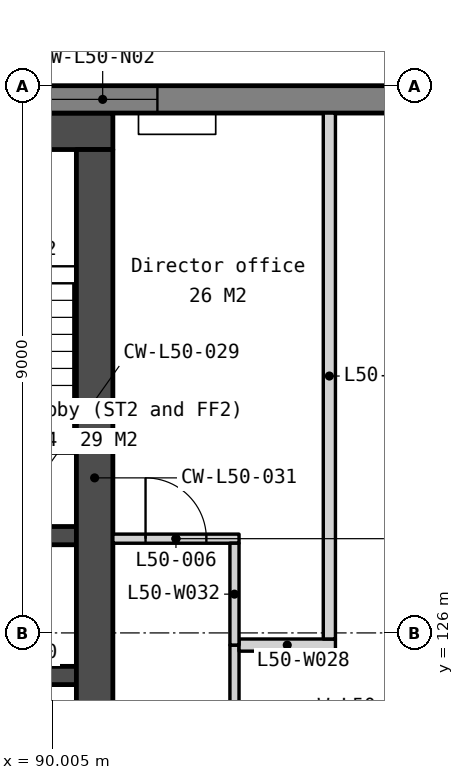
"""IFC4 building model, lengths in metres.
Left out: names, types, materials, properties, quantities, classifications, styles, units other than length and angle.
Written with IfcOpenShell. Run it as: python <this file> out.ifc"""

import sys

from ifc_helpers import new_model, si_unit, direction, frame, frame_2d, origin, place, context, subcontext, project, spatial, polyline, rectangle, outline, extrude, element, fill, save


model = new_model("IFC4")
c1 = context("Model", 3, precision=1e-05, world=origin(), true_north=direction((0.0, 1.0)))
c2 = subcontext(c1, "Body", "Model", "MODEL_VIEW")
j1 = project(units=[si_unit("LENGTHUNIT", "METRE"), si_unit("PLANEANGLEUNIT", "RADIAN")], contexts=[c1])
p1 = place(None, origin())
s1 = spatial("IfcSite", under=j1, at=p1, CompositionType="ELEMENT")
p2 = place(p1, origin())
s2 = spatial("IfcBuilding", under=s1, at=p2, CompositionType="ELEMENT")
p3 = place(p2, frame((0.0, 0.0, 199.7)))
s3 = spatial("IfcBuildingStorey", under=s2, at=p3, CompositionType="ELEMENT", Elevation=199.7)
p4 = place(p3, frame((69.0, 134.25, 0.0), z_axis=(0.0, 0.0, 1.0), x_axis=(1.0, 0.0, 0.0)))
e1 = element("IfcWall", 1, at=p4, inside=s3, PredefinedType="SOLIDWALL", context=c2, shape_type="SweptSolid", body=[
    extrude(rectangle(XDim=22.0, YDim=0.6, at=frame_2d((11.0, 0.0))), origin(), (0.0, 0.0, 1.0), 3.75),
])
for number, where, z_axis, x_axis in (
    (2, (87.85, 127.6, 0.0), (0.0, 0.0, 1.0), (1.0, 0.0, 0.0)),
    (3, (87.85, 125.3, 0.0), (0.0, 0.0, 1.0), (1.0, 0.0, 0.0)),
):
    element("IfcWall", number, at=place(p3, frame(where, z_axis=z_axis, x_axis=x_axis)), inside=s3, PredefinedType="SOLIDWALL", context=c2, shape_type="SweptSolid", body=[
        extrude(rectangle(XDim=2.55, YDim=0.3, at=frame_2d((1.275, 0.0))), origin(), (0.0, 0.0, 1.0), 3.75),
    ])
p5 = place(p3, frame((90.7, 133.95, 0.0), z_axis=(0.0, 0.0, 1.0), x_axis=(0.0, -1.0, 0.0)))
e4 = element("IfcWall", 4, at=p5, inside=s3, PredefinedType="SOLIDWALL", context=c2, shape_type="SweptSolid", body=[
    extrude(rectangle(XDim=10.8, YDim=0.6, at=frame_2d((5.4, 0.0))), origin(), (0.0, 0.0, 1.0), 3.75),
])
p6 = place(p3, frame((99.365, 134.775, -0.15), z_axis=(0.0, 0.0, 1.0), x_axis=(-1.0, 0.0, 0.0)))
e5 = element("IfcWall", 5, at=p6, inside=s3, PredefinedType="SOLIDWALL", context=c2, shape_type="SweptSolid", body=[
    extrude(outline(polyline([(38.729, 0.0), (38.729, 3.9), (0.0, 3.9), (0.0, 0.0), (38.729, 0.0)])), frame((0.0, 0.225, 0.0), z_axis=(0.0, -1.0, 0.0), x_axis=(1.0, 0.0, 0.0)), (0.0, 0.0, 1.0), 0.45),
])
p7 = place(p6, frame((0.776, 0.0, 0.95)))
e6 = element("IfcOpeningElement", 6, at=p7, cuts=e5, PredefinedType="OPENING", context=c2, shape_type="SweptSolid", body=[
    extrude(rectangle(XDim=1.2, YDim=2.2, at=frame_2d((0.6, 1.1))), frame((0.0, 0.235, 0.0), z_axis=(0.0, -1.0, 0.0), x_axis=(1.0, 0.0, 0.0)), (0.0, 0.0, 1.0), 0.47),
])
p8 = place(p6, frame((7.632, 0.0, 0.95)))
e7 = element("IfcOpeningElement", 7, at=p8, cuts=e5, PredefinedType="OPENING", context=c2, shape_type="SweptSolid", body=[
    extrude(rectangle(XDim=1.8, YDim=2.2, at=frame_2d((0.9, 1.1))), frame((0.0, 0.235, 0.0), z_axis=(0.0, -1.0, 0.0), x_axis=(1.0, 0.0, 0.0)), (0.0, 0.0, 1.0), 0.47),
])
p9 = place(p6, frame((9.932, 0.0, 0.95)))
e8 = element("IfcOpeningElement", 8, at=p9, cuts=e5, PredefinedType="OPENING", context=c2, shape_type="SweptSolid", body=[
    extrude(rectangle(XDim=1.8, YDim=2.2, at=frame_2d((0.9, 1.1))), frame((0.0, 0.235, 0.0), z_axis=(0.0, -1.0, 0.0), x_axis=(1.0, 0.0, 0.0)), (0.0, 0.0, 1.0), 0.47),
])
p10 = place(p6, frame((17.315, 0.0, 0.95)))
e9 = element("IfcOpeningElement", 9, at=p10, cuts=e5, PredefinedType="OPENING", context=c2, shape_type="SweptSolid", body=[
    extrude(rectangle(XDim=1.8, YDim=2.2, at=frame_2d((0.9, 1.1))), frame((0.0, 0.235, 0.0), z_axis=(0.0, -1.0, 0.0), x_axis=(1.0, 0.0, 0.0)), (0.0, 0.0, 1.0), 0.47),
])
p11 = place(p6, frame((19.615, 0.0, 0.95)))
e10 = element("IfcOpeningElement", 10, at=p11, cuts=e5, PredefinedType="OPENING", context=c2, shape_type="SweptSolid", body=[
    extrude(rectangle(XDim=1.8, YDim=2.2, at=frame_2d((0.9, 1.1))), frame((0.0, 0.235, 0.0), z_axis=(0.0, -1.0, 0.0), x_axis=(1.0, 0.0, 0.0)), (0.0, 0.0, 1.0), 0.47),
])
p12 = place(p6, frame((26.997, 0.0, 0.95)))
e11 = element("IfcOpeningElement", 11, at=p12, cuts=e5, PredefinedType="OPENING", context=c2, shape_type="SweptSolid", body=[
    extrude(rectangle(XDim=1.8, YDim=2.2, at=frame_2d((0.9, 1.1))), frame((0.0, 0.235, 0.0), z_axis=(0.0, -1.0, 0.0), x_axis=(1.0, 0.0, 0.0)), (0.0, 0.0, 1.0), 0.47),
])
p13 = place(p6, frame((29.297, 0.0, 0.95)))
e12 = element("IfcOpeningElement", 12, at=p13, cuts=e5, PredefinedType="OPENING", context=c2, shape_type="SweptSolid", body=[
    extrude(rectangle(XDim=1.8, YDim=2.2, at=frame_2d((0.9, 1.1))), frame((0.0, 0.235, 0.0), z_axis=(0.0, -1.0, 0.0), x_axis=(1.0, 0.0, 0.0)), (0.0, 0.0, 1.0), 0.47),
])
p14 = place(p6, frame((36.753, 0.0, 0.95)))
e13 = element("IfcOpeningElement", 13, at=p14, cuts=e5, PredefinedType="OPENING", context=c2, shape_type="SweptSolid", body=[
    extrude(rectangle(XDim=1.2, YDim=2.2, at=frame_2d((0.6, 1.1))), frame((0.0, 0.235, 0.0), z_axis=(0.0, -1.0, 0.0), x_axis=(1.0, 0.0, 0.0)), (0.0, 0.0, 1.0), 0.47),
])
p15 = place(p3, frame((81.505, 98.627, -0.15), z_axis=(0.0, 0.0, 1.0), x_axis=(0.500002199942, 0.866024133644, 0.0)))
e14 = element("IfcWall", 14, at=p15, inside=s3, PredefinedType="SOLIDWALL", context=c2, shape_type="SweptSolid", body=[
    extrude(outline(polyline([(38.729, 0.0), (38.729, 3.9), (0.0, 3.9), (0.0, 0.0), (38.729, 0.0)])), frame((0.0, 0.225, 0.0), z_axis=(0.0, -1.0, 0.0), x_axis=(1.0, 0.0, 0.0)), (0.0, 0.0, 1.0), 0.45),
])
p16 = place(p15, frame((0.776, 0.0, 0.95)))
e15 = element("IfcOpeningElement", 15, at=p16, cuts=e14, PredefinedType="OPENING", context=c2, shape_type="SweptSolid", body=[
    extrude(rectangle(XDim=1.2, YDim=2.2, at=frame_2d((0.6, 1.1))), frame((0.0, 0.235, 0.0), z_axis=(0.0, -1.0, 0.0), x_axis=(1.0, 0.0, 0.0)), (0.0, 0.0, 1.0), 0.47),
])
p17 = place(p15, frame((7.632, 0.0, 0.95)))
e16 = element("IfcOpeningElement", 16, at=p17, cuts=e14, PredefinedType="OPENING", context=c2, shape_type="SweptSolid", body=[
    extrude(rectangle(XDim=1.8, YDim=2.2, at=frame_2d((0.9, 1.1))), frame((0.0, 0.235, 0.0), z_axis=(0.0, -1.0, 0.0), x_axis=(1.0, 0.0, 0.0)), (0.0, 0.0, 1.0), 0.47),
])
p18 = place(p15, frame((9.932, 0.0, 0.95)))
e17 = element("IfcOpeningElement", 17, at=p18, cuts=e14, PredefinedType="OPENING", context=c2, shape_type="SweptSolid", body=[
    extrude(rectangle(XDim=1.8, YDim=2.2, at=frame_2d((0.9, 1.1))), frame((0.0, 0.235, 0.0), z_axis=(0.0, -1.0, 0.0), x_axis=(1.0, 0.0, 0.0)), (0.0, 0.0, 1.0), 0.47),
])
p19 = place(p15, frame((17.315, 0.0, 0.95)))
e18 = element("IfcOpeningElement", 18, at=p19, cuts=e14, PredefinedType="OPENING", context=c2, shape_type="SweptSolid", body=[
    extrude(rectangle(XDim=1.8, YDim=2.2, at=frame_2d((0.9, 1.1))), frame((0.0, 0.235, 0.0), z_axis=(0.0, -1.0, 0.0), x_axis=(1.0, 0.0, 0.0)), (0.0, 0.0, 1.0), 0.47),
])
p20 = place(p15, frame((19.615, 0.0, 0.95)))
e19 = element("IfcOpeningElement", 19, at=p20, cuts=e14, PredefinedType="OPENING", context=c2, shape_type="SweptSolid", body=[
    extrude(rectangle(XDim=1.8, YDim=2.2, at=frame_2d((0.9, 1.1))), frame((0.0, 0.235, 0.0), z_axis=(0.0, -1.0, 0.0), x_axis=(1.0, 0.0, 0.0)), (0.0, 0.0, 1.0), 0.47),
])
p21 = place(p15, frame((26.997, 0.0, 0.95)))
e20 = element("IfcOpeningElement", 20, at=p21, cuts=e14, PredefinedType="OPENING", context=c2, shape_type="SweptSolid", body=[
    extrude(rectangle(XDim=1.8, YDim=2.2, at=frame_2d((0.9, 1.1))), frame((0.0, 0.235, 0.0), z_axis=(0.0, -1.0, 0.0), x_axis=(1.0, 0.0, 0.0)), (0.0, 0.0, 1.0), 0.47),
])
p22 = place(p15, frame((29.297, 0.0, 0.95)))
e21 = element("IfcOpeningElement", 21, at=p22, cuts=e14, PredefinedType="OPENING", context=c2, shape_type="SweptSolid", body=[
    extrude(rectangle(XDim=1.8, YDim=2.2, at=frame_2d((0.9, 1.1))), frame((0.0, 0.235, 0.0), z_axis=(0.0, -1.0, 0.0), x_axis=(1.0, 0.0, 0.0)), (0.0, 0.0, 1.0), 0.47),
])
p23 = place(p15, frame((36.753, 0.0, 0.95)))
e22 = element("IfcOpeningElement", 22, at=p23, cuts=e14, PredefinedType="OPENING", context=c2, shape_type="SweptSolid", body=[
    extrude(rectangle(XDim=1.2, YDim=2.2, at=frame_2d((0.6, 1.1))), frame((0.0, 0.235, 0.0), z_axis=(0.0, -1.0, 0.0), x_axis=(1.0, 0.0, 0.0)), (0.0, 0.0, 1.0), 0.47),
])
p24 = place(p3, frame((93.0, 120.025, 0.0), z_axis=(0.0, 0.0, 1.0), x_axis=(0.0, 1.0, 0.0)))
e23 = element("IfcWall", 23, at=p24, inside=s3, PredefinedType="PARTITIONING", context=c2, shape_type="SweptSolid", body=[
    extrude(rectangle(XDim=5.775, YDim=0.15, at=frame_2d((2.888, 0.0))), origin(), (0.0, 0.0, 1.0), 3.75),
])
p25 = place(p24, frame((2.663, 0.0, 0.0)))
e24 = element("IfcOpeningElement", 24, at=p25, cuts=e23, PredefinedType="OPENING", context=c2, shape_type="SweptSolid", body=[
    extrude(rectangle(XDim=1.8, YDim=2.1, at=frame_2d((0.9, 1.05))), frame((0.0, 0.085, 0.0), z_axis=(0.0, -1.0, 0.0), x_axis=(1.0, 0.0, 0.0)), (0.0, 0.0, 1.0), 0.17),
])
p26 = place(p3, frame((93.075, 125.8, 0.0), z_axis=(0.0, 0.0, 1.0), x_axis=(1.0, 0.0, 0.0)))
e25 = element("IfcWall", 25, at=p26, inside=s3, PredefinedType="PARTITIONING", context=c2, shape_type="SweptSolid", body=[
    extrude(rectangle(XDim=1.585, YDim=0.2, at=frame_2d((0.793, 0.0))), origin(), (0.0, 0.0, 1.0), 3.75),
])
p27 = place(p3, frame((94.561, 125.9, 0.0), z_axis=(0.0, 0.0, 1.0), x_axis=(0.0, 1.0, 0.0)))
e26 = element("IfcWall", 26, at=p27, inside=s3, PredefinedType="PARTITIONING", context=c2, shape_type="SweptSolid", body=[
    extrude(rectangle(XDim=8.65, YDim=0.2, at=frame_2d((4.325, 0.0))), origin(), (0.0, 0.0, 1.0), 3.75),
])
p28 = place(p3, frame((91.0, 127.55, 0.0), z_axis=(0.0, 0.0, 1.0), x_axis=(1.0, 0.0, 0.0)))
e27 = element("IfcWall", 27, at=p28, inside=s3, PredefinedType="PARTITIONING", context=c2, shape_type="SweptSolid", body=[
    extrude(rectangle(XDim=2.075, YDim=0.15, at=frame_2d((1.038, 0.0))), origin(), (0.0, 0.0, 1.0), 3.75),
])
p29 = place(p28, frame((0.538, 0.0, 0.0)))
e28 = element("IfcOpeningElement", 28, at=p29, cuts=e27, PredefinedType="OPENING", context=c2, shape_type="SweptSolid", body=[
    extrude(rectangle(XDim=1.0, YDim=2.1, at=frame_2d((0.5, 1.05))), frame((0.0, 0.085, 0.0), z_axis=(0.0, -1.0, 0.0), x_axis=(1.0, 0.0, 0.0)), (0.0, 0.0, 1.0), 0.17),
])
p30 = place(p3, frame((93.0, 125.8, 0.0), z_axis=(0.0, 0.0, 1.0), x_axis=(0.0, 1.0, 0.0)))
e29 = element("IfcWall", 29, at=p30, inside=s3, PredefinedType="PARTITIONING", context=c2, shape_type="SweptSolid", body=[
    extrude(rectangle(XDim=1.675, YDim=0.15, at=frame_2d((0.837, 0.0))), origin(), (0.0, 0.0, 1.0), 3.75),
])
p31 = place(p8, origin())
e30 = element("IfcWindow", 30, at=p31, inside=s3, PartitioningType="SINGLE_PANEL", PredefinedType="WINDOW", context=c2, shape_type="SweptSolid", body=[
    extrude(rectangle(XDim=1.8, YDim=2.2, at=frame_2d((0.9, 1.1))), frame((0.0, 0.03, 0.0), z_axis=(0.0, -1.0, 0.0), x_axis=(1.0, 0.0, 0.0)), (0.0, 0.0, 1.0), 0.06),
])
fill(e7, e30)
p32 = place(p29, origin())
e31 = element("IfcDoor", 31, at=p32, inside=s3, OperationType="SINGLE_SWING_LEFT", PredefinedType="DOOR", context=c2, shape_type="SweptSolid", body=[
    extrude(rectangle(XDim=1.0, YDim=2.1, at=frame_2d((0.5, 1.05))), frame((0.0, 0.025, 0.0), z_axis=(0.0, -1.0, 0.0), x_axis=(1.0, 0.0, 0.0)), (0.0, 0.0, 1.0), 0.05),
])
fill(e28, e31)
save(model, sys.argv[1])
